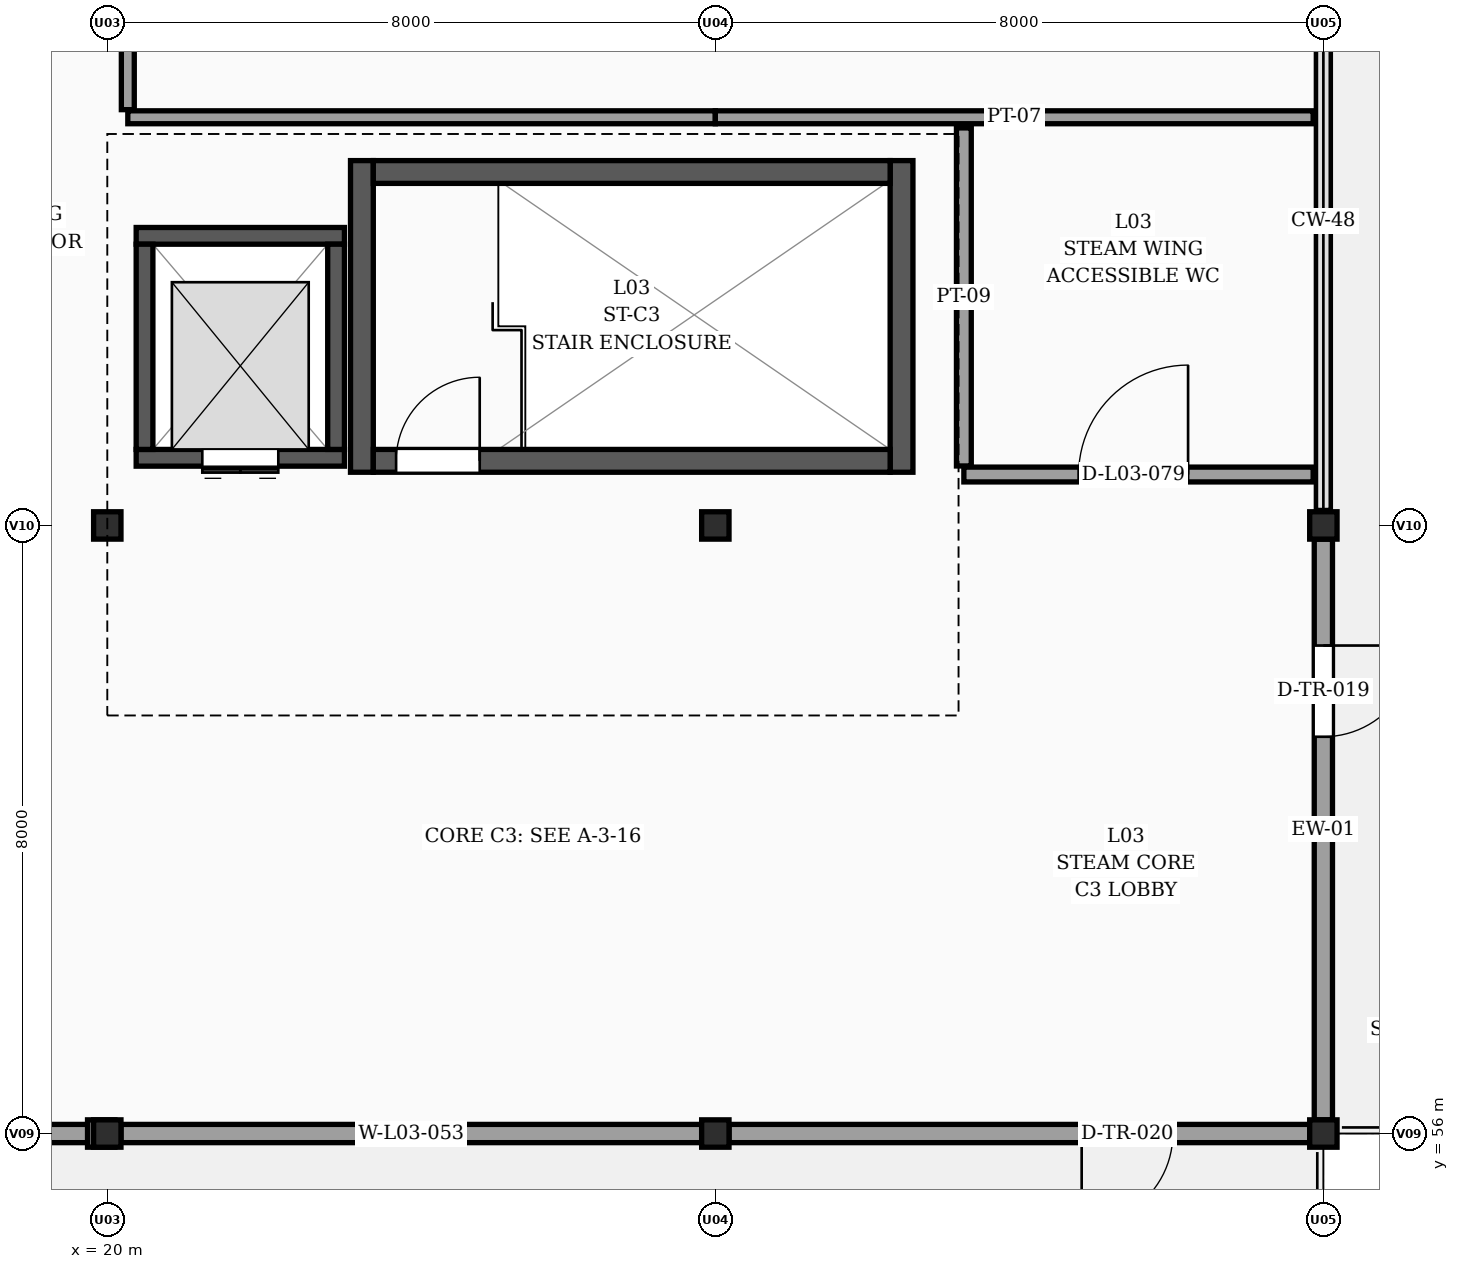
"""IFC4 building model, lengths in metres.
Left out: names, types, materials, properties, quantities, classifications, styles, units other than length and angle.
Written with IfcOpenShell. Run it as: python <this file> out.ifc"""

import sys

from ifc_helpers import new_model, si_unit, direction, frame, frame_2d, origin, origin_2d, place, context, subcontext, project, spatial, rectangle, extrude, element, fill, save


model = new_model("IFC4")
c1 = context("Model", 3, precision=1e-05, world=origin(), true_north=direction((0.0, 1.0)))
c2 = subcontext(c1, "Body", "Model", "MODEL_VIEW")
j1 = project(units=[si_unit("LENGTHUNIT", "METRE"), si_unit("PLANEANGLEUNIT", "RADIAN")], contexts=[c1])
p1 = place(None, origin())
s1 = spatial("IfcSite", under=j1, at=p1, CompositionType="ELEMENT")
p2 = place(p1, origin())
s2 = spatial("IfcBuilding", under=s1, at=p2, CompositionType="ELEMENT")
p3 = place(p2, frame((0.0, 0.0, 12.3)))
s3 = spatial("IfcBuildingStorey", under=s2, at=p3, CompositionType="ELEMENT", Elevation=12.3)
p4 = place(p3, frame((20.0, 56.0, 0.0), z_axis=(0.0, 0.0, 1.0), x_axis=(1.0, 0.0, 0.0)))
e1 = element("IfcColumn", 1, at=p4, inside=s3, PredefinedType="COLUMN", context=c2, shape_type="SweptSolid", body=[
    extrude(rectangle(XDim=0.36, YDim=0.36, at=origin_2d()), origin(), (0.0, 0.0, 1.0), 5.977),
])
p5 = place(p3, frame((20.0, 64.0, 0.0), z_axis=(0.0, 0.0, 1.0), x_axis=(1.0, 0.0, 0.0)))
e2 = element("IfcColumn", 2, at=p5, inside=s3, PredefinedType="COLUMN", context=c2, shape_type="SweptSolid", body=[
    extrude(rectangle(XDim=0.36, YDim=0.36, at=origin_2d()), origin(), (0.0, 0.0, 1.0), 5.448),
])
p6 = place(p3, frame((28.0, 56.0, 0.0), z_axis=(0.0, 0.0, 1.0), x_axis=(1.0, 0.0, 0.0)))
e3 = element("IfcColumn", 3, at=p6, inside=s3, PredefinedType="COLUMN", context=c2, shape_type="SweptSolid", body=[
    extrude(rectangle(XDim=0.36, YDim=0.36, at=origin_2d()), origin(), (0.0, 0.0, 1.0), 5.636),
])
p7 = place(p3, frame((28.0, 64.0, 0.0), z_axis=(0.0, 0.0, 1.0), x_axis=(1.0, 0.0, 0.0)))
e4 = element("IfcColumn", 4, at=p7, inside=s3, PredefinedType="COLUMN", context=c2, shape_type="SweptSolid", body=[
    extrude(rectangle(XDim=0.36, YDim=0.36, at=origin_2d()), origin(), (0.0, 0.0, 1.0), 5.106),
])
p8 = place(p3, frame((36.0, 56.0, 0.0), z_axis=(0.0, 0.0, 1.0), x_axis=(1.0, 0.0, 0.0)))
e5 = element("IfcColumn", 5, at=p8, inside=s3, PredefinedType="COLUMN", context=c2, shape_type="SweptSolid", body=[
    extrude(rectangle(XDim=0.36, YDim=0.36, at=origin_2d()), origin(), (0.0, 0.0, 1.0), 5.295),
])
p9 = place(p3, frame((36.0, 64.0, 0.0), z_axis=(0.0, 0.0, 1.0), x_axis=(1.0, 0.0, 0.0)))
e6 = element("IfcColumn", 6, at=p9, inside=s3, PredefinedType="COLUMN", context=c2, shape_type="SweptSolid", body=[
    extrude(rectangle(XDim=0.36, YDim=0.36, at=origin_2d()), origin(), (0.0, 0.0, 1.0), 4.765),
])
p10 = place(p3, frame((36.0, 71.82, 0.0), z_axis=(0.0, 0.0, 1.0), x_axis=(0.0, -1.0, 0.0)))
e7 = element("IfcWall", 7, at=p10, inside=s3, PredefinedType="SOLIDWALL", context=c2, shape_type="SweptSolid", body=[
    extrude(rectangle(XDim=7.64, YDim=0.185, at=frame_2d((3.82, 0.0))), origin(), (0.0, 0.0, 1.0), 0.95),
])
p11 = place(p3, frame((36.0, 63.82, 0.0), z_axis=(0.0, 0.0, 1.0), x_axis=(0.0, -1.0, 0.0)))
e8 = element("IfcWall", 8, at=p11, inside=s3, PredefinedType="SOLIDWALL", context=c2, shape_type="SweptSolid", body=[
    extrude(rectangle(XDim=7.64, YDim=0.24, at=frame_2d((3.82, 0.0))), origin(), (0.0, 0.0, 1.0), 4.187),
])
p12 = place(p11, frame((1.4, 0.0, 0.0)))
e9 = element("IfcOpeningElement", 9, at=p12, cuts=e8, PredefinedType="OPENING", context=c2, shape_type="SweptSolid", body=[
    extrude(rectangle(XDim=1.2, YDim=2.15, at=frame_2d((0.6, 1.075))), frame((0.0, 0.13, 0.0), z_axis=(0.0, -1.0, 0.0), x_axis=(1.0, 0.0, 0.0)), (0.0, 0.0, 1.0), 0.26),
])
p13 = place(p3, frame((35.82, 56.0, 0.0), z_axis=(0.0, 0.0, 1.0), x_axis=(-1.0, 0.0, 0.0)))
e10 = element("IfcWall", 10, at=p13, inside=s3, PredefinedType="SOLIDWALL", context=c2, shape_type="SweptSolid", body=[
    extrude(rectangle(XDim=7.64, YDim=0.24, at=frame_2d((3.82, 0.0))), origin(), (0.0, 0.0, 1.0), 4.712),
])
p14 = place(p13, frame((1.8, 0.0, 0.0)))
e11 = element("IfcOpeningElement", 11, at=p14, cuts=e10, PredefinedType="OPENING", context=c2, shape_type="SweptSolid", body=[
    extrude(rectangle(XDim=1.2, YDim=2.15, at=frame_2d((0.6, 1.075))), frame((0.0, 0.13, 0.0), z_axis=(0.0, -1.0, 0.0), x_axis=(1.0, 0.0, 0.0)), (0.0, 0.0, 1.0), 0.26),
])
p15 = place(p3, frame((27.82, 56.0, 0.0), z_axis=(0.0, 0.0, 1.0), x_axis=(-1.0, 0.0, 0.0)))
e12 = element("IfcWall", 12, at=p15, inside=s3, PredefinedType="SOLIDWALL", context=c2, shape_type="SweptSolid", body=[
    extrude(rectangle(XDim=7.64, YDim=0.24, at=frame_2d((3.82, 0.0))), origin(), (0.0, 0.0, 1.0), 5.054),
])
p16 = place(p15, frame((3.22, 0.0, 0.95)))
e13 = element("IfcOpeningElement", 13, at=p16, cuts=e12, PredefinedType="OPENING", context=c2, shape_type="SweptSolid", body=[
    extrude(rectangle(XDim=1.2, YDim=1.2, at=frame_2d((0.6, 0.6))), frame((0.0, 0.13, 0.0), z_axis=(0.0, -1.0, 0.0), x_axis=(1.0, 0.0, 0.0)), (0.0, 0.0, 1.0), 0.26),
])
p17 = place(p3, frame((19.82, 56.0, 0.0), z_axis=(0.0, 0.0, 1.0), x_axis=(-1.0, 0.0, 0.0)))
e14 = element("IfcWall", 14, at=p17, inside=s3, PredefinedType="SOLIDWALL", context=c2, shape_type="SweptSolid", body=[
    extrude(rectangle(XDim=7.64, YDim=0.24, at=frame_2d((3.82, 0.0))), origin(), (0.0, 0.0, 1.0), 5.395),
])
for number, where, z_axis, x_axis in (
    (15, (23.35, 64.7, 0.0), (0.0, 0.0, 1.0), (0.0, 1.0, 0.0)),
    (16, (30.45, 68.8, 0.0), (0.0, 0.0, 1.0), (0.0, -1.0, 0.0)),
):
    element("IfcWall", number, at=place(p3, frame(where, z_axis=z_axis, x_axis=x_axis)), inside=s3, PredefinedType="SHEAR", context=c2, shape_type="SweptSolid", body=[
        extrude(rectangle(XDim=4.1, YDim=0.3, at=frame_2d((2.05, 0.0))), origin(), (0.0, 0.0, 1.0), 5.565),
    ])
p18 = place(p3, frame((23.5, 64.85, 0.0), z_axis=(0.0, 0.0, 1.0), x_axis=(1.0, 0.0, 0.0)))
e17 = element("IfcWall", 17, at=p18, inside=s3, PredefinedType="SHEAR", context=c2, shape_type="SweptSolid", body=[
    extrude(rectangle(XDim=6.8, YDim=0.3, at=frame_2d((3.4, 0.0))), origin(), (0.0, 0.0, 1.0), 5.565),
])
p19 = place(p18, frame((0.3, 0.0, 0.0)))
e18 = element("IfcOpeningElement", 18, at=p19, cuts=e17, PredefinedType="OPENING", context=c2, shape_type="SweptSolid", body=[
    extrude(rectangle(XDim=1.1, YDim=2.15, at=frame_2d((0.55, 1.075))), frame((0.0, 0.16, 0.0), z_axis=(0.0, -1.0, 0.0), x_axis=(1.0, 0.0, 0.0)), (0.0, 0.0, 1.0), 0.32),
])
p20 = place(p3, frame((30.3, 68.65, 0.0), z_axis=(0.0, 0.0, 1.0), x_axis=(-1.0, 0.0, 0.0)))
e19 = element("IfcWall", 19, at=p20, inside=s3, PredefinedType="SHEAR", context=c2, shape_type="SweptSolid", body=[
    extrude(rectangle(XDim=6.8, YDim=0.3, at=frame_2d((3.4, 0.0))), origin(), (0.0, 0.0, 1.0), 5.565),
])
p21 = place(p3, frame((23.12, 64.89, 0.0), z_axis=(0.0, 0.0, 1.0), x_axis=(-1.0, 0.0, 0.0)))
e20 = element("IfcWall", 20, at=p21, inside=s3, PredefinedType="SHEAR", context=c2, shape_type="SweptSolid", body=[
    extrude(rectangle(XDim=2.74, YDim=0.22, at=frame_2d((1.37, 0.0))), origin(), (0.0, 0.0, 1.0), 5.806),
])
p22 = place(p21, frame((0.87, 0.0, 0.0)))
e21 = element("IfcOpeningElement", 21, at=p22, cuts=e20, PredefinedType="OPENING", context=c2, shape_type="SweptSolid", body=[
    extrude(rectangle(XDim=1.0, YDim=2.15, at=frame_2d((0.5, 1.075))), frame((0.0, 0.12, 0.0), z_axis=(0.0, -1.0, 0.0), x_axis=(1.0, 0.0, 0.0)), (0.0, 0.0, 1.0), 0.24),
])
p23 = place(p3, frame((20.38, 67.81, 0.0), z_axis=(0.0, 0.0, 1.0), x_axis=(1.0, 0.0, 0.0)))
e22 = element("IfcWall", 22, at=p23, inside=s3, PredefinedType="SHEAR", context=c2, shape_type="SweptSolid", body=[
    extrude(rectangle(XDim=2.74, YDim=0.22, at=frame_2d((1.37, 0.0))), origin(), (0.0, 0.0, 1.0), 5.806),
])
for number, where, z_axis, x_axis in (
    (23, (20.49, 65.0, 0.0), (0.0, 0.0, 1.0), (0.0, 1.0, 0.0)),
    (24, (23.01, 67.7, 0.0), (0.0, 0.0, 1.0), (0.0, -1.0, 0.0)),
):
    element("IfcWall", number, at=place(p3, frame(where, z_axis=z_axis, x_axis=x_axis)), inside=s3, PredefinedType="SHEAR", context=c2, shape_type="SweptSolid", body=[
        extrude(rectangle(XDim=2.7, YDim=0.22, at=frame_2d((1.35, 0.0))), origin(), (0.0, 0.0, 1.0), 5.806),
    ])
p24 = place(p3, frame((20.27, 69.37, 0.0), z_axis=(0.0, 0.0, 1.0), x_axis=(1.0, 0.0, 0.0)))
e25 = element("IfcWall", 25, at=p24, inside=s3, PredefinedType="PARTITIONING", context=c2, shape_type="SweptSolid", body=[
    extrude(rectangle(XDim=7.73, YDim=0.17, at=frame_2d((3.865, 0.0))), origin(), (0.0, 0.0, 1.0), 3.65),
])
p25 = place(p3, frame((28.0, 69.37, 0.0), z_axis=(0.0, 0.0, 1.0), x_axis=(1.0, 0.0, 0.0)))
e26 = element("IfcWall", 26, at=p25, inside=s3, PredefinedType="PARTITIONING", context=c2, shape_type="SweptSolid", body=[
    extrude(rectangle(XDim=7.865, YDim=0.17, at=frame_2d((3.933, 0.0))), origin(), (0.0, 0.0, 1.0), 3.65),
])
p26 = place(p3, frame((20.27, 69.47, 0.0), z_axis=(0.0, 0.0, 1.0), x_axis=(0.0, 1.0, 0.0)))
e27 = element("IfcWall", 27, at=p26, inside=s3, PredefinedType="PARTITIONING", context=c2, shape_type="SweptSolid", body=[
    extrude(rectangle(XDim=2.335, YDim=0.17, at=frame_2d((1.167, 0.0))), origin(), (0.0, 0.0, 1.0), 3.65),
])
p27 = place(p3, frame((31.27, 64.67, 0.0), z_axis=(0.0, 0.0, 1.0), x_axis=(1.0, 0.0, 0.0)))
e28 = element("IfcWall", 28, at=p27, inside=s3, PredefinedType="PARTITIONING", context=c2, shape_type="SweptSolid", body=[
    extrude(rectangle(XDim=4.595, YDim=0.195, at=frame_2d((2.298, 0.0))), origin(), (0.0, 0.0, 1.0), 3.65),
])
p28 = place(p27, frame((1.51, 0.0, 0.0)))
e29 = element("IfcOpeningElement", 29, at=p28, cuts=e28, PredefinedType="OPENING", context=c2, shape_type="SweptSolid", body=[
    extrude(rectangle(XDim=1.44, YDim=2.15, at=frame_2d((0.72, 1.075))), frame((0.0, 0.107, 0.0), z_axis=(0.0, -1.0, 0.0), x_axis=(1.0, 0.0, 0.0)), (0.0, 0.0, 1.0), 0.215),
])
p29 = place(p3, frame((31.27, 64.782, 0.0), z_axis=(0.0, 0.0, 1.0), x_axis=(0.0, 1.0, 0.0)))
e30 = element("IfcWall", 30, at=p29, inside=s3, PredefinedType="PARTITIONING", context=c2, shape_type="SweptSolid", body=[
    extrude(rectangle(XDim=4.448, YDim=0.195, at=frame_2d((2.224, 0.0))), origin(), (0.0, 0.0, 1.0), 3.65),
])
p30 = place(p12, origin())
e31 = element("IfcDoor", 31, at=p30, inside=s3, OperationType="SINGLE_SWING_LEFT", PredefinedType="DOOR", context=c2, shape_type="SweptSolid", body=[
    extrude(rectangle(XDim=1.2, YDim=2.15, at=frame_2d((0.6, 1.075))), frame((0.0, 0.025, 0.0), z_axis=(0.0, -1.0, 0.0), x_axis=(1.0, 0.0, 0.0)), (0.0, 0.0, 1.0), 0.05),
])
fill(e9, e31)
p31 = place(p14, origin())
e32 = element("IfcDoor", 32, at=p31, inside=s3, OperationType="SINGLE_SWING_RIGHT", PredefinedType="DOOR", context=c2, shape_type="SweptSolid", body=[
    extrude(rectangle(XDim=1.2, YDim=2.15, at=frame_2d((0.6, 1.075))), frame((0.0, 0.025, 0.0), z_axis=(0.0, -1.0, 0.0), x_axis=(1.0, 0.0, 0.0)), (0.0, 0.0, 1.0), 0.05),
])
fill(e11, e32)
p32 = place(p16, origin())
e33 = element("IfcWindow", 33, at=p32, inside=s3, PartitioningType="SINGLE_PANEL", PredefinedType="WINDOW", context=c2, shape_type="SweptSolid", body=[
    extrude(rectangle(XDim=1.2, YDim=1.2, at=frame_2d((0.6, 0.6))), frame((0.0, 0.03, 0.0), z_axis=(0.0, -1.0, 0.0), x_axis=(1.0, 0.0, 0.0)), (0.0, 0.0, 1.0), 0.06),
])
fill(e13, e33)
p33 = place(p19, origin())
e34 = element("IfcDoor", 34, at=p33, inside=s3, OperationType="SINGLE_SWING_RIGHT", PredefinedType="DOOR", context=c2, shape_type="SweptSolid", body=[
    extrude(rectangle(XDim=1.1, YDim=2.15, at=frame_2d((0.55, 1.075))), frame((0.0, 0.025, 0.0), z_axis=(0.0, -1.0, 0.0), x_axis=(1.0, 0.0, 0.0)), (0.0, 0.0, 1.0), 0.05),
])
fill(e18, e34)
p34 = place(p22, origin())
e35 = element("IfcDoor", 35, at=p34, inside=s3, OperationType="DOUBLE_DOOR_SLIDING", PredefinedType="DOOR", context=c2, shape_type="SweptSolid", body=[
    extrude(rectangle(XDim=1.0, YDim=2.15, at=frame_2d((0.5, 1.075))), frame((0.0, 0.025, 0.0), z_axis=(0.0, -1.0, 0.0), x_axis=(1.0, 0.0, 0.0)), (0.0, 0.0, 1.0), 0.05),
])
fill(e21, e35)
p35 = place(p28, origin())
e36 = element("IfcDoor", 36, at=p35, inside=s3, OperationType="SINGLE_SWING_RIGHT", PredefinedType="DOOR", context=c2, shape_type="SweptSolid", body=[
    extrude(rectangle(XDim=1.44, YDim=2.15, at=frame_2d((0.72, 1.075))), frame((0.0, 0.025, 0.0), z_axis=(0.0, -1.0, 0.0), x_axis=(1.0, 0.0, 0.0)), (0.0, 0.0, 1.0), 0.05),
])
fill(e29, e36)
save(model, sys.argv[1])
